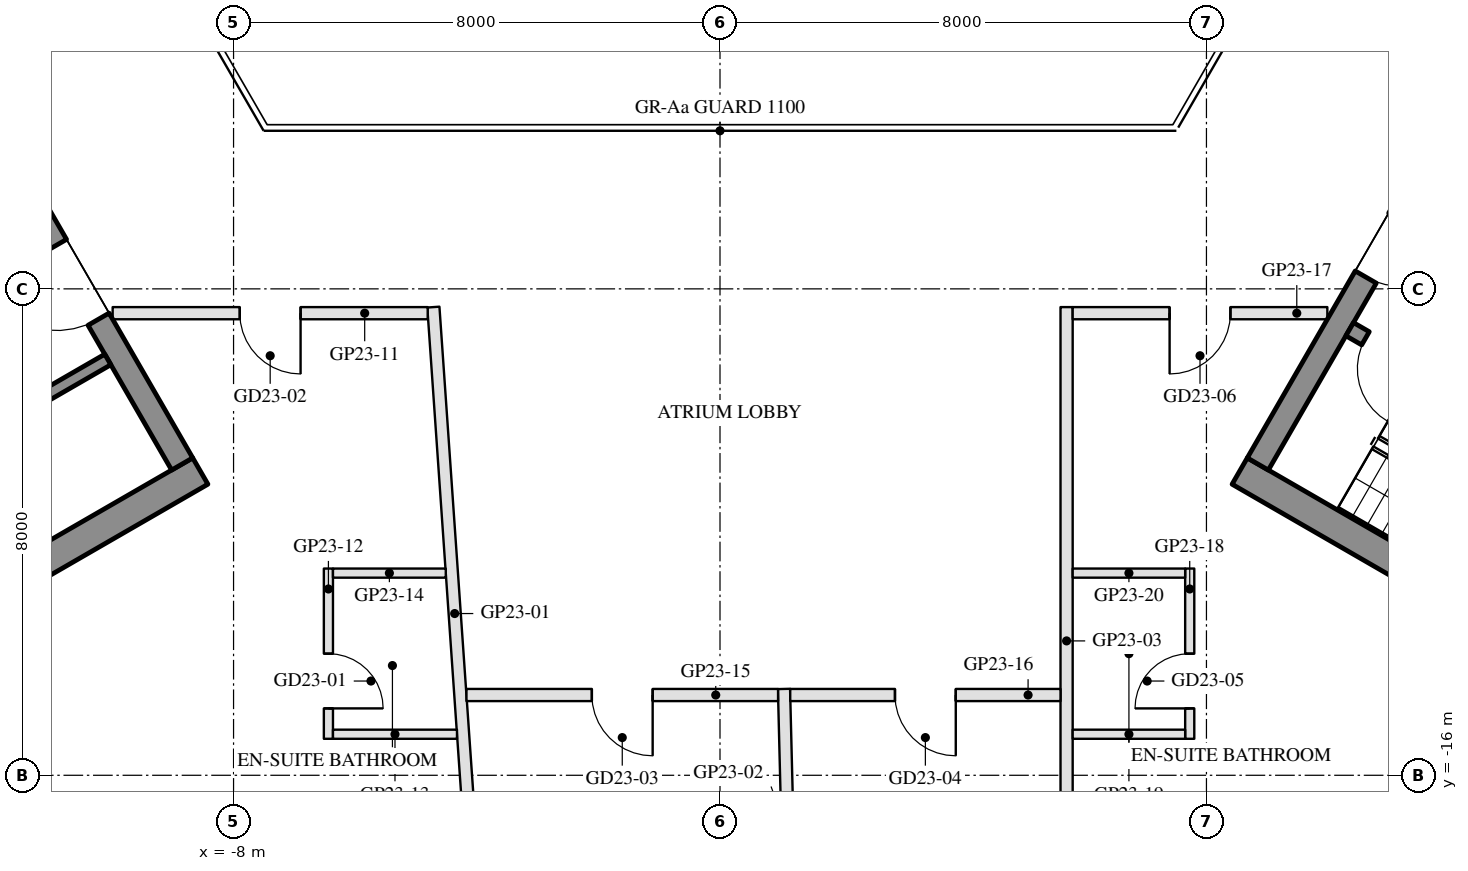
"""IFC4 building model, lengths in metres.
Left out: names, types, materials, properties, quantities, classifications, styles, units other than length and angle.
Written with IfcOpenShell. Run it as: python <this file> out.ifc"""

import sys

from ifc_helpers import new_model, si_unit, direction, frame, frame_2d, origin, place, context, subcontext, project, spatial, rectangle, extrude, element, fill, save


model = new_model("IFC4")
c1 = context("Model", 3, precision=1e-05, world=origin(), true_north=direction((0.0, 1.0)))
c2 = subcontext(c1, "Body", "Model", "MODEL_VIEW")
j1 = project(units=[si_unit("LENGTHUNIT", "METRE"), si_unit("PLANEANGLEUNIT", "RADIAN")], contexts=[c1])
p1 = place(None, origin())
s1 = spatial("IfcSite", under=j1, at=p1, CompositionType="ELEMENT")
p2 = place(p1, origin())
s2 = spatial("IfcBuilding", under=s1, at=p2, CompositionType="ELEMENT")
p3 = place(p2, frame((0.0, 0.0, 250.4)))
s3 = spatial("IfcBuildingStorey", under=s2, at=p3, CompositionType="ELEMENT", Elevation=250.4)
p4 = place(p3, frame((-8.547, -10.997, 0.0), z_axis=(0.0, 0.0, 1.0), x_axis=(-0.866025009528, -0.500000682871, 0.0)))
e1 = element("IfcWall", 1, at=p4, inside=s3, PredefinedType="SHEAR", context=c2, shape_type="SweptSolid", body=[
    extrude(rectangle(XDim=14.837, YDim=0.5, at=frame_2d((7.418, 0.0))), origin(), (0.0, 0.0, 1.0), 3.5),
])
p5 = place(p3, frame((-13.845, -2.22, 0.0), z_axis=(0.0, 0.0, 1.0), x_axis=(0.500004234368, -0.866022959057, 0.0)))
e2 = element("IfcWall", 2, at=p5, inside=s3, PredefinedType="SHEAR", context=c2, shape_type="SweptSolid", body=[
    extrude(rectangle(XDim=10.0, YDim=0.4, at=frame_2d((5.0, 0.0))), origin(), (0.0, 0.0, 1.0), 3.5),
])
p6 = place(p5, frame((3.55, 0.0, 0.0)))
e3 = element("IfcOpeningElement", 3, at=p6, cuts=e2, PredefinedType="OPENING", context=c2, shape_type="SweptSolid", body=[
    extrude(rectangle(XDim=1.1, YDim=2.1, at=frame_2d((0.55, 1.05))), frame((0.0, 0.21, 0.0), z_axis=(0.0, -1.0, 0.0), x_axis=(1.0, 0.0, 0.0)), (0.0, 0.0, 1.0), 0.42),
])
p7 = place(p5, frame((5.85, 0.0, 0.0)))
e4 = element("IfcOpeningElement", 4, at=p7, cuts=e2, PredefinedType="OPENING", context=c2, shape_type="SweptSolid", body=[
    extrude(rectangle(XDim=1.4, YDim=2.1, at=frame_2d((0.7, 1.05))), frame((0.0, 0.21, 0.0), z_axis=(0.0, -1.0, 0.0), x_axis=(1.0, 0.0, 0.0)), (0.0, 0.0, 1.0), 0.42),
])
p8 = place(p3, frame((-10.068, -9.162, 0.0), z_axis=(0.0, 0.0, 1.0), x_axis=(-0.866032725843, -0.499987317609, 0.0)))
e5 = element("IfcWall", 5, at=p8, inside=s3, PredefinedType="SHEAR", context=c2, shape_type="SweptSolid", body=[
    extrude(rectangle(XDim=10.16, YDim=0.2, at=frame_2d((5.08, 0.0))), origin(), (0.0, 0.0, 1.0), 3.5),
])
p9 = place(p8, frame((1.99, 0.0, 0.0)))
e6 = element("IfcOpeningElement", 6, at=p9, cuts=e5, PredefinedType="OPENING", context=c2, shape_type="SweptSolid", body=[
    extrude(rectangle(XDim=0.9, YDim=2.1, at=frame_2d((0.45, 1.05))), frame((0.0, 0.11, 0.0), z_axis=(0.0, -1.0, 0.0), x_axis=(1.0, 0.0, 0.0)), (0.0, 0.0, 1.0), 0.22),
])
p10 = place(p8, frame((7.07, 0.0, 0.0)))
e7 = element("IfcOpeningElement", 7, at=p10, cuts=e5, PredefinedType="OPENING", context=c2, shape_type="SweptSolid", body=[
    extrude(rectangle(XDim=0.9, YDim=2.1, at=frame_2d((0.45, 1.05))), frame((0.0, 0.11, 0.0), z_axis=(0.0, -1.0, 0.0), x_axis=(1.0, 0.0, 0.0)), (0.0, 0.0, 1.0), 0.22),
])
p11 = place(p3, frame((8.547, -10.997, 0.0), z_axis=(0.0, 0.0, 1.0), x_axis=(0.866025009528, -0.500000682871, 0.0)))
e8 = element("IfcWall", 8, at=p11, inside=s3, PredefinedType="SHEAR", context=c2, shape_type="SweptSolid", body=[
    extrude(rectangle(XDim=14.837, YDim=0.5, at=frame_2d((7.418, 0.0))), origin(), (0.0, 0.0, 1.0), 3.5),
])
p12 = place(p3, frame((8.845, -10.88, 0.0), z_axis=(0.0, 0.0, 1.0), x_axis=(0.500004234368, 0.866022959057, 0.0)))
e9 = element("IfcWall", 9, at=p12, inside=s3, PredefinedType="SHEAR", context=c2, shape_type="SweptSolid", body=[
    extrude(rectangle(XDim=10.0, YDim=0.4, at=frame_2d((5.0, 0.0))), origin(), (0.0, 0.0, 1.0), 3.5),
])
p13 = place(p12, frame((3.55, 0.0, 0.0)))
e10 = element("IfcOpeningElement", 10, at=p13, cuts=e9, PredefinedType="OPENING", context=c2, shape_type="SweptSolid", body=[
    extrude(rectangle(XDim=1.1, YDim=2.1, at=frame_2d((0.55, 1.05))), frame((0.0, 0.21, 0.0), z_axis=(0.0, -1.0, 0.0), x_axis=(1.0, 0.0, 0.0)), (0.0, 0.0, 1.0), 0.42),
])
p14 = place(p12, frame((5.85, 0.0, 0.0)))
e11 = element("IfcOpeningElement", 11, at=p14, cuts=e9, PredefinedType="OPENING", context=c2, shape_type="SweptSolid", body=[
    extrude(rectangle(XDim=1.4, YDim=2.1, at=frame_2d((0.7, 1.05))), frame((0.0, 0.21, 0.0), z_axis=(0.0, -1.0, 0.0), x_axis=(1.0, 0.0, 0.0)), (0.0, 0.0, 1.0), 0.42),
])
p15 = place(p3, frame((10.356, -8.664, 0.0), z_axis=(0.0, 0.0, 1.0), x_axis=(0.866028629588, -0.499994412703, 0.0)))
e12 = element("IfcWall", 12, at=p15, inside=s3, PredefinedType="SHEAR", context=c2, shape_type="SweptSolid", body=[
    extrude(rectangle(XDim=6.45, YDim=0.25, at=frame_2d((3.225, 0.0))), origin(), (0.0, 0.0, 1.0), 3.5),
])
p16 = place(p15, frame((0.3, 0.0, 0.0)))
e13 = element("IfcOpeningElement", 13, at=p16, cuts=e12, PredefinedType="OPENING", context=c2, shape_type="SweptSolid", body=[
    extrude(rectangle(XDim=1.0, YDim=2.1, at=frame_2d((0.5, 1.05))), frame((0.0, 0.135, 0.0), z_axis=(0.0, -1.0, 0.0), x_axis=(1.0, 0.0, 0.0)), (0.0, 0.0, 1.0), 0.27),
])
p17 = place(p3, frame((-4.013, -18.38, 0.0), z_axis=(0.0, 0.0, 1.0), x_axis=(-0.06939415619, 0.997589319854, 0.0)))
e14 = element("IfcWall", 14, at=p17, inside=s3, PredefinedType="PARTITIONING", context=c2, shape_type="SweptSolid", body=[
    extrude(rectangle(XDim=10.104, YDim=0.2, at=frame_2d((5.052, 0.0))), origin(), (0.0, 0.0, 1.0), 2.95),
])
p18 = place(p3, frame((1.17, -19.28, 0.0), z_axis=(0.0, 0.0, 1.0), x_axis=(-0.025029816209, 0.999686705073, 0.0)))
e15 = element("IfcWall", 15, at=p18, inside=s3, PredefinedType="PARTITIONING", context=c2, shape_type="SweptSolid", body=[
    extrude(rectangle(XDim=4.701, YDim=0.2, at=frame_2d((2.351, 0.0))), origin(), (0.0, 0.0, 1.0), 3.1),
])
p19 = place(p3, frame((5.7, -19.28, 0.0), z_axis=(0.0, 0.0, 1.0), x_axis=(0.0, 1.0, 0.0)))
e16 = element("IfcWall", 16, at=p19, inside=s3, PredefinedType="PARTITIONING", context=c2, shape_type="SweptSolid", body=[
    extrude(rectangle(XDim=10.98, YDim=0.2, at=frame_2d((5.49, 0.0))), origin(), (0.0, 0.0, 1.0), 3.1),
])
p20 = place(p3, frame((-4.807, -8.4, 0.0), z_axis=(0.0, 0.0, 1.0), x_axis=(-1.0, 0.0, 0.0)))
e17 = element("IfcWall", 17, at=p20, inside=s3, PredefinedType="PARTITIONING", context=c2, shape_type="SweptSolid", body=[
    extrude(rectangle(XDim=5.181, YDim=0.2, at=frame_2d((2.591, 0.0))), origin(), (0.0, 0.0, 1.0), 2.95),
])
p21 = place(p20, frame((2.091, 0.0, 0.0)))
e18 = element("IfcOpeningElement", 18, at=p21, cuts=e17, PredefinedType="OPENING", context=c2, shape_type="SweptSolid", body=[
    extrude(rectangle(XDim=1.0, YDim=2.1, at=frame_2d((0.5, 1.05))), frame((0.0, 0.11, 0.0), z_axis=(0.0, -1.0, 0.0), x_axis=(1.0, 0.0, 0.0)), (0.0, 0.0, 1.0), 0.22),
])
p22 = place(p3, frame((-6.44, -12.6, 0.0), z_axis=(0.0, 0.0, 1.0), x_axis=(0.0, -1.0, 0.0)))
e19 = element("IfcWall", 19, at=p22, inside=s3, PredefinedType="PARTITIONING", context=c2, shape_type="SweptSolid", body=[
    extrude(rectangle(XDim=2.8, YDim=0.15, at=frame_2d((1.4, 0.0))), origin(), (0.0, 0.0, 1.0), 3.55),
])
p23 = place(p22, frame((1.4, 0.0, 0.0)))
e20 = element("IfcOpeningElement", 20, at=p23, cuts=e19, PredefinedType="OPENING", context=c2, shape_type="SweptSolid", body=[
    extrude(rectangle(XDim=0.9, YDim=2.1, at=frame_2d((0.45, 1.05))), frame((0.0, 0.085, 0.0), z_axis=(0.0, -1.0, 0.0), x_axis=(1.0, 0.0, 0.0)), (0.0, 0.0, 1.0), 0.17),
])
p24 = place(p3, frame((-6.365, -15.325, 0.0), z_axis=(0.0, 0.0, 1.0), x_axis=(1.0, 0.0, 0.0)))
e21 = element("IfcWall", 21, at=p24, inside=s3, PredefinedType="PARTITIONING", context=c2, shape_type="SweptSolid", body=[
    extrude(rectangle(XDim=2.04, YDim=0.15, at=frame_2d((1.02, 0.0))), origin(), (0.0, 0.0, 1.0), 3.55),
])
p25 = place(p3, frame((-6.365, -12.675, 0.0), z_axis=(0.0, 0.0, 1.0), x_axis=(1.0, 0.0, 0.0)))
e22 = element("IfcWall", 22, at=p25, inside=s3, PredefinedType="PARTITIONING", context=c2, shape_type="SweptSolid", body=[
    extrude(rectangle(XDim=1.855, YDim=0.15, at=frame_2d((0.928, 0.0))), origin(), (0.0, 0.0, 1.0), 3.55),
])
p26 = place(p3, frame((0.955, -14.68, 0.0), z_axis=(0.0, 0.0, 1.0), x_axis=(-1.0, 0.0, 0.0)))
e23 = element("IfcWall", 23, at=p26, inside=s3, PredefinedType="PARTITIONING", context=c2, shape_type="SweptSolid", body=[
    extrude(rectangle(XDim=5.125, YDim=0.2, at=frame_2d((2.562, 0.0))), origin(), (0.0, 0.0, 1.0), 2.95),
])
p27 = place(p26, frame((2.062, 0.0, 0.0)))
e24 = element("IfcOpeningElement", 24, at=p27, cuts=e23, PredefinedType="OPENING", context=c2, shape_type="SweptSolid", body=[
    extrude(rectangle(XDim=1.0, YDim=2.1, at=frame_2d((0.5, 1.05))), frame((0.0, 0.11, 0.0), z_axis=(0.0, -1.0, 0.0), x_axis=(1.0, 0.0, 0.0)), (0.0, 0.0, 1.0), 0.22),
])
p28 = place(p3, frame((5.6, -14.68, 0.0), z_axis=(0.0, 0.0, 1.0), x_axis=(-1.0, 0.0, 0.0)))
e25 = element("IfcWall", 25, at=p28, inside=s3, PredefinedType="PARTITIONING", context=c2, shape_type="SweptSolid", body=[
    extrude(rectangle(XDim=4.445, YDim=0.2, at=frame_2d((2.223, 0.0))), origin(), (0.0, 0.0, 1.0), 2.95),
])
p29 = place(p28, frame((1.723, 0.0, 0.0)))
e26 = element("IfcOpeningElement", 26, at=p29, cuts=e25, PredefinedType="OPENING", context=c2, shape_type="SweptSolid", body=[
    extrude(rectangle(XDim=1.0, YDim=2.1, at=frame_2d((0.5, 1.05))), frame((0.0, 0.11, 0.0), z_axis=(0.0, -1.0, 0.0), x_axis=(1.0, 0.0, 0.0)), (0.0, 0.0, 1.0), 0.22),
])
p30 = place(p3, frame((9.988, -8.4, 0.0), z_axis=(0.0, 0.0, 1.0), x_axis=(-1.0, 0.0, 0.0)))
e27 = element("IfcWall", 27, at=p30, inside=s3, PredefinedType="PARTITIONING", context=c2, shape_type="SweptSolid", body=[
    extrude(rectangle(XDim=4.188, YDim=0.2, at=frame_2d((2.094, 0.0))), origin(), (0.0, 0.0, 1.0), 2.95),
])
p31 = place(p30, frame((1.594, 0.0, 0.0)))
e28 = element("IfcOpeningElement", 28, at=p31, cuts=e27, PredefinedType="OPENING", context=c2, shape_type="SweptSolid", body=[
    extrude(rectangle(XDim=1.0, YDim=2.1, at=frame_2d((0.5, 1.05))), frame((0.0, 0.11, 0.0), z_axis=(0.0, -1.0, 0.0), x_axis=(1.0, 0.0, 0.0)), (0.0, 0.0, 1.0), 0.22),
])
p32 = place(p3, frame((7.725, -15.4, 0.0), z_axis=(0.0, 0.0, 1.0), x_axis=(0.0, 1.0, 0.0)))
e29 = element("IfcWall", 29, at=p32, inside=s3, PredefinedType="PARTITIONING", context=c2, shape_type="SweptSolid", body=[
    extrude(rectangle(XDim=2.8, YDim=0.15, at=frame_2d((1.4, 0.0))), origin(), (0.0, 0.0, 1.0), 2.95),
])
p33 = place(p32, frame((0.5, 0.0, 0.0)))
e30 = element("IfcOpeningElement", 30, at=p33, cuts=e29, PredefinedType="OPENING", context=c2, shape_type="SweptSolid", body=[
    extrude(rectangle(XDim=0.9, YDim=2.1, at=frame_2d((0.45, 1.05))), frame((0.0, 0.085, 0.0), z_axis=(0.0, -1.0, 0.0), x_axis=(1.0, 0.0, 0.0)), (0.0, 0.0, 1.0), 0.17),
])
for number, where, z_axis, x_axis in (
    (31, (5.8, -15.325, 0.0), (0.0, 0.0, 1.0), (1.0, 0.0, 0.0)),
    (32, (5.8, -12.675, 0.0), (0.0, 0.0, 1.0), (1.0, 0.0, 0.0)),
):
    element("IfcWall", number, at=place(p3, frame(where, z_axis=z_axis, x_axis=x_axis)), inside=s3, PredefinedType="PARTITIONING", context=c2, shape_type="SweptSolid", body=[
        extrude(rectangle(XDim=1.85, YDim=0.15, at=frame_2d((0.925, 0.0))), origin(), (0.0, 0.0, 1.0), 3.55),
    ])
p34 = place(p3, frame((10.375, -1.169, 0.0), z_axis=(0.0, 0.0, 1.0), x_axis=(0.500055316652, -0.865993464345, 0.0)))
e33 = element("IfcWall", 33, at=p34, inside=s3, PredefinedType="PARTITIONING", context=c2, shape_type="SweptSolid", body=[
    extrude(rectangle(XDim=3.788, YDim=0.2, at=frame_2d((1.894, 0.0))), origin(), (0.0, 0.0, 1.0), 2.95),
])
p35 = place(p34, frame((1.394, 0.0, 0.0)))
e34 = element("IfcOpeningElement", 34, at=p35, cuts=e33, PredefinedType="OPENING", context=c2, shape_type="SweptSolid", body=[
    extrude(rectangle(XDim=1.0, YDim=2.1, at=frame_2d((0.5, 1.05))), frame((0.0, 0.11, 0.0), z_axis=(0.0, -1.0, 0.0), x_axis=(1.0, 0.0, 0.0)), (0.0, 0.0, 1.0), 0.22),
])
p36 = place(p3, frame((-12.269, -4.45, 0.0), z_axis=(0.0, 0.0, 1.0), x_axis=(0.500011931275, 0.86601851515, 0.0)))
e35 = element("IfcWall", 35, at=p36, inside=s3, PredefinedType="PARTITIONING", context=c2, shape_type="SweptSolid", body=[
    extrude(rectangle(XDim=4.088, YDim=0.2, at=frame_2d((2.044, 0.0))), origin(), (0.0, 0.0, 1.0), 2.95),
])
p37 = place(p36, frame((1.544, 0.0, 0.0)))
e36 = element("IfcOpeningElement", 36, at=p37, cuts=e35, PredefinedType="OPENING", context=c2, shape_type="SweptSolid", body=[
    extrude(rectangle(XDim=1.0, YDim=2.1, at=frame_2d((0.5, 1.05))), frame((0.0, 0.11, 0.0), z_axis=(0.0, -1.0, 0.0), x_axis=(1.0, 0.0, 0.0)), (0.0, 0.0, 1.0), 0.22),
])
p38 = place(p7, frame((1.4, 0.0, 0.0), z_axis=(0.0, 0.0, 1.0), x_axis=(-1.0, 0.0, 0.0)))
e37 = element("IfcDoor", 37, at=p38, inside=s3, OperationType="DOUBLE_DOOR_SINGLE_SWING", PredefinedType="DOOR", context=c2, shape_type="SweptSolid", body=[
    extrude(rectangle(XDim=1.4, YDim=2.1, at=frame_2d((0.7, 1.05))), frame((0.0, 0.025, 0.0), z_axis=(0.0, -1.0, 0.0), x_axis=(1.0, 0.0, 0.0)), (0.0, 0.0, 1.0), 0.05),
])
fill(e4, e37)
p39 = place(p13, frame((1.1, 0.0, 0.0), z_axis=(0.0, 0.0, 1.0), x_axis=(-1.0, 0.0, 0.0)))
e38 = element("IfcDoor", 38, at=p39, inside=s3, OperationType="SINGLE_SWING_LEFT", PredefinedType="DOOR", context=c2, shape_type="SweptSolid", body=[
    extrude(rectangle(XDim=1.1, YDim=2.1, at=frame_2d((0.55, 1.05))), frame((0.0, 0.025, 0.0), z_axis=(0.0, -1.0, 0.0), x_axis=(1.0, 0.0, 0.0)), (0.0, 0.0, 1.0), 0.05),
])
fill(e10, e38)
p40 = place(p16, frame((1.0, 0.0, 0.0), z_axis=(0.0, 0.0, 1.0), x_axis=(-1.0, 0.0, 0.0)))
e39 = element("IfcDoor", 39, at=p40, inside=s3, OperationType="SINGLE_SWING_LEFT", PredefinedType="DOOR", context=c2, shape_type="SweptSolid", body=[
    extrude(rectangle(XDim=1.0, YDim=2.1, at=frame_2d((0.5, 1.05))), frame((0.0, 0.025, 0.0), z_axis=(0.0, -1.0, 0.0), x_axis=(1.0, 0.0, 0.0)), (0.0, 0.0, 1.0), 0.05),
])
fill(e13, e39)
p41 = place(p23, origin())
e40 = element("IfcDoor", 40, at=p41, inside=s3, OperationType="SINGLE_SWING_RIGHT", PredefinedType="DOOR", context=c2, shape_type="SweptSolid", body=[
    extrude(rectangle(XDim=0.9, YDim=2.1, at=frame_2d((0.45, 1.05))), frame((0.0, 0.025, 0.0), z_axis=(0.0, -1.0, 0.0), x_axis=(1.0, 0.0, 0.0)), (0.0, 0.0, 1.0), 0.05),
])
fill(e20, e40)
p42 = place(p21, origin())
e41 = element("IfcDoor", 41, at=p42, inside=s3, OperationType="SINGLE_SWING_LEFT", PredefinedType="DOOR", context=c2, shape_type="SweptSolid", body=[
    extrude(rectangle(XDim=1.0, YDim=2.1, at=frame_2d((0.5, 1.05))), frame((0.0, 0.025, 0.0), z_axis=(0.0, -1.0, 0.0), x_axis=(1.0, 0.0, 0.0)), (0.0, 0.0, 1.0), 0.05),
])
fill(e18, e41)
p43 = place(p27, origin())
e42 = element("IfcDoor", 42, at=p43, inside=s3, OperationType="SINGLE_SWING_LEFT", PredefinedType="DOOR", context=c2, shape_type="SweptSolid", body=[
    extrude(rectangle(XDim=1.0, YDim=2.1, at=frame_2d((0.5, 1.05))), frame((0.0, 0.025, 0.0), z_axis=(0.0, -1.0, 0.0), x_axis=(1.0, 0.0, 0.0)), (0.0, 0.0, 1.0), 0.05),
])
fill(e24, e42)
p44 = place(p29, origin())
e43 = element("IfcDoor", 43, at=p44, inside=s3, OperationType="SINGLE_SWING_LEFT", PredefinedType="DOOR", context=c2, shape_type="SweptSolid", body=[
    extrude(rectangle(XDim=1.0, YDim=2.1, at=frame_2d((0.5, 1.05))), frame((0.0, 0.025, 0.0), z_axis=(0.0, -1.0, 0.0), x_axis=(1.0, 0.0, 0.0)), (0.0, 0.0, 1.0), 0.05),
])
fill(e26, e43)
p45 = place(p33, origin())
e44 = element("IfcDoor", 44, at=p45, inside=s3, OperationType="SINGLE_SWING_LEFT", PredefinedType="DOOR", context=c2, shape_type="SweptSolid", body=[
    extrude(rectangle(XDim=0.9, YDim=2.1, at=frame_2d((0.45, 1.05))), frame((0.0, 0.025, 0.0), z_axis=(0.0, -1.0, 0.0), x_axis=(1.0, 0.0, 0.0)), (0.0, 0.0, 1.0), 0.05),
])
fill(e30, e44)
p46 = place(p31, origin())
e45 = element("IfcDoor", 45, at=p46, inside=s3, OperationType="SINGLE_SWING_RIGHT", PredefinedType="DOOR", context=c2, shape_type="SweptSolid", body=[
    extrude(rectangle(XDim=1.0, YDim=2.1, at=frame_2d((0.5, 1.05))), frame((0.0, 0.025, 0.0), z_axis=(0.0, -1.0, 0.0), x_axis=(1.0, 0.0, 0.0)), (0.0, 0.0, 1.0), 0.05),
])
fill(e28, e45)
save(model, sys.argv[1])
